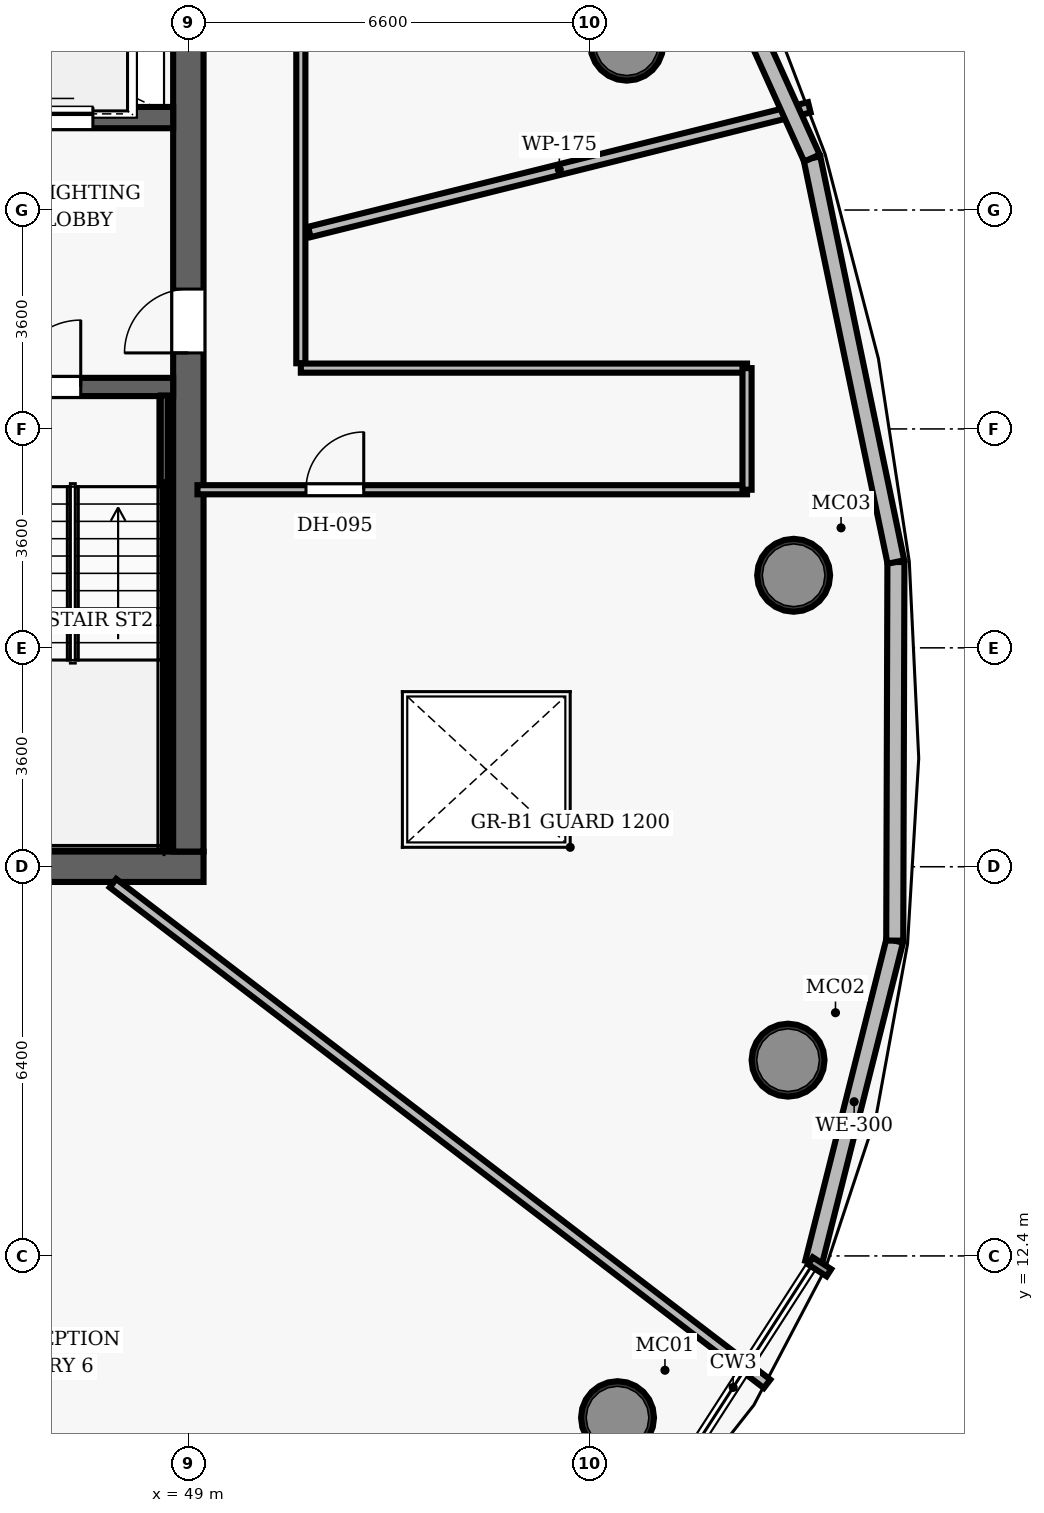
"""IFC4 building model, lengths in metres.
Left out: names, types, materials, properties, quantities, classifications, styles, units other than length and angle.
Written with IfcOpenShell. Run it as: python <this file> out.ifc"""

import sys

from ifc_helpers import new_model, si_unit, direction, frame, frame_2d, origin, origin_2d, place, context, subcontext, project, spatial, rectangle, hollow_circle, extrude, element, fill, save


model = new_model("IFC4")
c1 = context("Model", 3, precision=1e-05, world=origin(), true_north=direction((0.0, 1.0)))
c2 = subcontext(c1, "Body", "Model", "MODEL_VIEW")
j1 = project(units=[si_unit("LENGTHUNIT", "METRE"), si_unit("PLANEANGLEUNIT", "RADIAN")], contexts=[c1])
p1 = place(None, origin())
s1 = spatial("IfcSite", under=j1, at=p1, CompositionType="ELEMENT")
p2 = place(p1, origin())
s2 = spatial("IfcBuilding", under=s1, at=p2, CompositionType="ELEMENT")
p3 = place(p2, frame((0.0, 0.0, 205.85)))
s3 = spatial("IfcBuildingStorey", under=s2, at=p3, CompositionType="ELEMENT", Elevation=205.85)
p4 = place(p3, frame((26.75, 18.8, 0.0), z_axis=(0.0, 0.0, 1.0), x_axis=(1.0, 0.0, 0.0)))
e1 = element("IfcWall", 1, at=p4, inside=s3, PredefinedType="SHEAR", context=c2, shape_type="SweptSolid", body=[
    extrude(rectangle(XDim=22.5, YDim=0.5, at=frame_2d((11.25, 0.0))), origin(), (0.0, 0.0, 1.0), 3.85),
])
p5 = place(p4, frame((14.47, 0.0, 0.0)))
e2 = element("IfcOpeningElement", 2, at=p5, cuts=e1, PredefinedType="OPENING", context=c2, shape_type="SweptSolid", body=[
    extrude(rectangle(XDim=1.05, YDim=2.15, at=frame_2d((0.525, 1.075))), frame((0.0, 0.26, 0.0), z_axis=(0.0, -1.0, 0.0), x_axis=(1.0, 0.0, 0.0)), (0.0, 0.0, 1.0), 0.52),
])
p6 = place(p3, frame((49.0, 19.05, 0.0), z_axis=(0.0, 0.0, 1.0), x_axis=(0.0, 1.0, 0.0)))
e3 = element("IfcWall", 3, at=p6, inside=s3, PredefinedType="SHEAR", context=c2, shape_type="SweptSolid", body=[
    extrude(rectangle(XDim=13.9, YDim=0.5, at=frame_2d((6.95, 0.0))), origin(), (0.0, 0.0, 1.0), 3.85),
])
p7 = place(p6, frame((8.2, 0.0, 0.0)))
e4 = element("IfcOpeningElement", 4, at=p7, cuts=e3, PredefinedType="OPENING", context=c2, shape_type="SweptSolid", body=[
    extrude(rectangle(XDim=1.05, YDim=2.15, at=frame_2d((0.525, 1.075))), frame((0.0, 0.26, 0.0), z_axis=(0.0, -1.0, 0.0), x_axis=(1.0, 0.0, 0.0)), (0.0, 0.0, 1.0), 0.52),
])
for number, where, z_axis, x_axis in (
    (5, (56.058, 9.74, 0.0), (0.0, 0.0, 1.0), (1.0, 0.0, 0.0)),
    (6, (58.863, 15.619, 0.0), (0.0, 0.0, 1.0), (1.0, 0.0, 0.0)),
    (7, (58.955, 23.594, 0.0), (0.0, 0.0, 1.0), (1.0, 0.0, 0.0)),
    (8, (56.21, 32.327, 0.0), (0.0, 0.0, 1.0), (1.0, 0.0, 0.0)),
):
    element("IfcColumn", number, at=place(p3, frame(where, z_axis=z_axis, x_axis=x_axis)), inside=s3, PredefinedType="COLUMN", context=c2, shape_type="SweptSolid", body=[
        extrude(hollow_circle(Radius=0.6, WallThickness=0.05, at=origin_2d()), origin(), (0.0, 0.0, 1.0), 3.85),
    ])
p8 = place(p3, frame((45.08, 26.69, 0.0), z_axis=(0.0, 0.0, 1.0), x_axis=(1.0, 0.0, 0.0)))
e9 = element("IfcWall", 9, at=p8, inside=s3, PredefinedType="SHEAR", context=c2, shape_type="SweptSolid", body=[
    extrude(rectangle(XDim=3.67, YDim=0.3, at=frame_2d((1.835, 0.0))), origin(), (0.0, 0.0, 1.0), 3.85),
])
p9 = place(p8, frame((1.05, 0.0, 0.0)))
e10 = element("IfcOpeningElement", 10, at=p9, cuts=e9, PredefinedType="OPENING", context=c2, shape_type="SweptSolid", body=[
    extrude(rectangle(XDim=1.1, YDim=2.15, at=frame_2d((0.55, 1.075))), frame((0.0, 0.16, 0.0), z_axis=(0.0, -1.0, 0.0), x_axis=(1.0, 0.0, 0.0)), (0.0, 0.0, 1.0), 0.32),
])
p10 = place(p3, frame((48.605, 19.1, 0.0), z_axis=(0.0, 0.0, 1.0), x_axis=(0.0, 1.0, 0.0)))
e11 = element("IfcWall", 11, at=p10, inside=s3, PredefinedType="SHEAR", context=c2, shape_type="SweptSolid", body=[
    extrude(rectangle(XDim=7.45, YDim=0.12, at=frame_2d((3.725, 0.0))), origin(), (0.0, 0.0, 1.0), 3.85),
])
p11 = place(p3, frame((45.51, 19.16, 0.0), z_axis=(0.0, 0.0, 1.0), x_axis=(1.0, 0.0, 0.0)))
e12 = element("IfcWall", 12, at=p11, inside=s3, PredefinedType="SHEAR", context=c2, shape_type="SweptSolid", body=[
    extrude(rectangle(XDim=3.095, YDim=0.12, at=frame_2d((1.547, 0.0))), origin(), (0.0, 0.0, 1.0), 3.85),
])
p12 = place(p3, frame((45.08, 31.12, 0.0), z_axis=(0.0, 0.0, 1.0), x_axis=(1.0, 0.0, 0.0)))
e13 = element("IfcWall", 13, at=p12, inside=s3, PredefinedType="SHEAR", context=c2, shape_type="SweptSolid", body=[
    extrude(rectangle(XDim=3.67, YDim=0.35, at=frame_2d((1.835, 0.0))), origin(), (0.0, 0.0, 1.0), 3.035),
])
p13 = place(p12, frame((1.25, 0.0, 0.0)))
e14 = element("IfcOpeningElement", 14, at=p13, cuts=e13, PredefinedType="OPENING", context=c2, shape_type="SweptSolid", body=[
    extrude(rectangle(XDim=1.1, YDim=2.15, at=frame_2d((0.55, 1.075))), frame((0.0, 0.185, 0.0), z_axis=(0.0, -1.0, 0.0), x_axis=(1.0, 0.0, 0.0)), (0.0, 0.0, 1.0), 0.37),
])
p14 = place(p3, frame((50.85, 27.08, 0.0), z_axis=(0.0, 0.0, 1.0), x_axis=(0.0, 1.0, 0.0)))
e15 = element("IfcWall", 15, at=p14, inside=s3, PredefinedType="PARTITIONING", context=c2, shape_type="SweptSolid", body=[
    extrude(rectangle(XDim=8.12, YDim=0.15, at=frame_2d((4.06, 0.0))), origin(), (0.0, 0.0, 1.0), 3.035),
])
p15 = place(p3, frame((50.85, 27.0, 0.0), z_axis=(0.0, 0.0, 1.0), x_axis=(1.0, 0.0, 0.0)))
e16 = element("IfcWall", 16, at=p15, inside=s3, PredefinedType="PARTITIONING", context=c2, shape_type="SweptSolid", body=[
    extrude(rectangle(XDim=7.338, YDim=0.15, at=frame_2d((3.669, 0.0))), origin(), (0.0, 0.0, 1.0), 3.035),
])
p16 = place(p3, frame((49.15, 25.0, 0.0), z_axis=(0.0, 0.0, 1.0), x_axis=(1.0, 0.0, 0.0)))
e17 = element("IfcWall", 17, at=p16, inside=s3, PredefinedType="PARTITIONING", context=c2, shape_type="SweptSolid", body=[
    extrude(rectangle(XDim=9.038, YDim=0.15, at=frame_2d((4.519, 0.0))), origin(), (0.0, 0.0, 1.0), 3.035),
])
p17 = place(p16, frame((1.784, 0.0, 0.0)))
e18 = element("IfcOpeningElement", 18, at=p17, cuts=e17, PredefinedType="OPENING", context=c2, shape_type="SweptSolid", body=[
    extrude(rectangle(XDim=0.95, YDim=2.15, at=frame_2d((0.475, 1.075))), frame((0.0, 0.085, 0.0), z_axis=(0.0, -1.0, 0.0), x_axis=(1.0, 0.0, 0.0)), (0.0, 0.0, 1.0), 0.17),
])
p18 = place(p3, frame((58.188, 25.0, 0.0), z_axis=(0.0, 0.0, 1.0), x_axis=(0.0, 1.0, 0.0)))
e19 = element("IfcWall", 19, at=p18, inside=s3, PredefinedType="PARTITIONING", context=c2, shape_type="SweptSolid", body=[
    extrude(rectangle(XDim=2.0, YDim=0.15, at=frame_2d((1.0, 0.0))), origin(), (0.0, 0.0, 1.0), 3.035),
])
p19 = place(p3, frame((50.99, 29.239, 0.0), z_axis=(0.0, 0.0, 1.0), x_axis=(0.970296522977, 0.241918700182, 0.0)))
e20 = element("IfcWall", 20, at=p19, inside=s3, PredefinedType="PARTITIONING", context=c2, shape_type="SweptSolid", body=[
    extrude(rectangle(XDim=8.474, YDim=0.175, at=frame_2d((4.237, 0.0))), origin(), (0.0, 0.0, 1.0), 3.035),
])
p20 = place(p3, frame((47.76, 18.53, 0.0), z_axis=(0.0, 0.0, 1.0), x_axis=(0.794107620506, -0.607777168916, 0.0)))
e21 = element("IfcWall", 21, at=p20, inside=s3, PredefinedType="PARTITIONING", context=c2, shape_type="SweptSolid", body=[
    extrude(rectangle(XDim=13.547, YDim=0.175, at=frame_2d((6.773, 0.0))), origin(), (0.0, 0.0, 1.0), 3.035),
])
p21 = place(p3, frame((60.617, 17.585, 0.0), z_axis=(0.0, 0.0, 1.0), x_axis=(-0.244385353769, -0.969678193456, 0.0)))
e22 = element("IfcWall", 22, at=p21, inside=s3, PredefinedType="SOLIDWALL", context=c2, shape_type="SweptSolid", body=[
    extrude(rectangle(XDim=5.465, YDim=0.28, at=frame_2d((2.732, 0.0))), origin(), (0.0, 0.0, 1.0), 3.62),
])
p22 = place(p3, frame((60.637, 23.812, 0.0), z_axis=(0.0, 0.0, 1.0), x_axis=(-0.003136870423, -0.99999508001, 0.0)))
e23 = element("IfcWall", 23, at=p22, inside=s3, PredefinedType="SOLIDWALL", context=c2, shape_type="SweptSolid", body=[
    extrude(rectangle(XDim=6.226, YDim=0.28, at=frame_2d((3.113, 0.0))), origin(), (0.0, 0.0, 1.0), 3.62),
])
p23 = place(p3, frame((59.256, 30.454, 0.0), z_axis=(0.0, 0.0, 1.0), x_axis=(0.203597872563, -0.979054598216, 0.0)))
e24 = element("IfcWall", 24, at=p23, inside=s3, PredefinedType="SOLIDWALL", context=c2, shape_type="SweptSolid", body=[
    extrude(rectangle(XDim=6.785, YDim=0.28, at=frame_2d((3.392, 0.0))), origin(), (0.0, 0.0, 1.0), 3.62),
])
p24 = place(p3, frame((56.367, 36.849, 0.0), z_axis=(0.0, 0.0, 1.0), x_axis=(0.411673410611, -0.911331445192, 0.0)))
e25 = element("IfcWall", 25, at=p24, inside=s3, PredefinedType="SOLIDWALL", context=c2, shape_type="SweptSolid", body=[
    extrude(rectangle(XDim=7.018, YDim=0.28, at=frame_2d((3.509, 0.0))), origin(), (0.0, 0.0, 1.0), 3.62),
])
p25 = place(p9, origin())
e26 = element("IfcDoor", 26, at=p25, inside=s3, OperationType="SINGLE_SWING_RIGHT", PredefinedType="DOOR", context=c2, shape_type="SweptSolid", body=[
    extrude(rectangle(XDim=1.1, YDim=2.15, at=frame_2d((0.55, 1.075))), frame((0.0, 0.025, 0.0), z_axis=(0.0, -1.0, 0.0), x_axis=(1.0, 0.0, 0.0)), (0.0, 0.0, 1.0), 0.05),
])
fill(e10, e26)
p26 = place(p7, origin())
e27 = element("IfcDoor", 27, at=p26, inside=s3, OperationType="SINGLE_SWING_LEFT", PredefinedType="DOOR", context=c2, shape_type="SweptSolid", body=[
    extrude(rectangle(XDim=1.05, YDim=2.15, at=frame_2d((0.525, 1.075))), frame((0.0, 0.025, 0.0), z_axis=(0.0, -1.0, 0.0), x_axis=(1.0, 0.0, 0.0)), (0.0, 0.0, 1.0), 0.05),
])
fill(e4, e27)
p27 = place(p17, origin())
e28 = element("IfcDoor", 28, at=p27, inside=s3, OperationType="SINGLE_SWING_RIGHT", PredefinedType="DOOR", context=c2, shape_type="SweptSolid", body=[
    extrude(rectangle(XDim=0.95, YDim=2.15, at=frame_2d((0.475, 1.075))), frame((0.0, 0.025, 0.0), z_axis=(0.0, -1.0, 0.0), x_axis=(1.0, 0.0, 0.0)), (0.0, 0.0, 1.0), 0.05),
])
fill(e18, e28)
p28 = place(p13, origin())
e29 = element("IfcDoor", 29, at=p28, inside=s3, OperationType="SLIDING_TO_LEFT", PredefinedType="DOOR", context=c2, shape_type="SweptSolid", body=[
    extrude(rectangle(XDim=1.1, YDim=2.15, at=frame_2d((0.55, 1.075))), frame((0.0, 0.025, 0.0), z_axis=(0.0, -1.0, 0.0), x_axis=(1.0, 0.0, 0.0)), (0.0, 0.0, 1.0), 0.05),
])
fill(e14, e29)
save(model, sys.argv[1])
